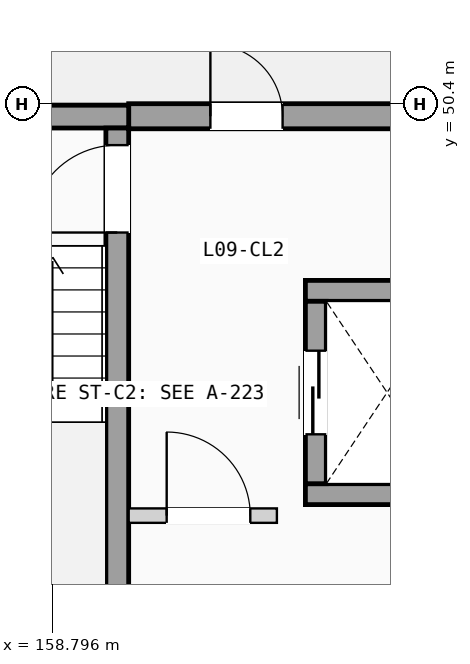
"""IFC4 building model, lengths in metres.
Left out: names, types, materials, properties, quantities, classifications, styles, units other than length and angle.
Written with IfcOpenShell. Run it as: python <this file> out.ifc"""

import sys

from ifc_helpers import new_model, si_unit, direction, frame, frame_2d, origin, place, context, subcontext, project, spatial, rectangle, extrude, element, fill, save


model = new_model("IFC4")
c1 = context("Model", 3, precision=1e-05, world=origin(), true_north=direction((0.0, 1.0)))
c2 = subcontext(c1, "Body", "Model", "MODEL_VIEW")
j1 = project(units=[si_unit("LENGTHUNIT", "METRE"), si_unit("PLANEANGLEUNIT", "RADIAN")], contexts=[c1])
p1 = place(None, origin())
s1 = spatial("IfcSite", under=j1, at=p1, CompositionType="ELEMENT")
p2 = place(p1, origin())
s2 = spatial("IfcBuilding", under=s1, at=p2, CompositionType="ELEMENT")
p3 = place(p2, frame((0.0, 0.0, 30.975)))
s3 = spatial("IfcBuildingStorey", under=s2, at=p3, CompositionType="ELEMENT", Elevation=30.975)
p4 = place(p3, frame((159.8, 50.235, 0.0), z_axis=(0.0, 0.0, 1.0), x_axis=(1.0, 0.0, 0.0)))
e1 = element("IfcWall", 1, at=p4, inside=s3, PredefinedType="SOLIDWALL", context=c2, shape_type="SweptSolid", body=[
    extrude(rectangle(XDim=4.15, YDim=0.33, at=frame_2d((2.075, 0.0))), origin(), (0.0, 0.0, 1.0), 2.9),
])
p5 = place(p4, frame((1.075, 0.0, 0.0)))
e2 = element("IfcOpeningElement", 2, at=p5, cuts=e1, PredefinedType="OPENING", context=c2, shape_type="SweptSolid", body=[
    extrude(rectangle(XDim=0.95, YDim=2.15, at=frame_2d((0.475, 1.075))), frame((0.0, 0.175, 0.0), z_axis=(0.0, -1.0, 0.0), x_axis=(1.0, 0.0, 0.0)), (0.0, 0.0, 1.0), 0.35),
])
p6 = place(p3, frame((156.2, 50.23, 0.0), z_axis=(0.0, 0.0, 1.0), x_axis=(1.0, 0.0, 0.0)))
e3 = element("IfcWall", 3, at=p6, inside=s3, PredefinedType="SHEAR", context=c2, shape_type="SweptSolid", body=[
    extrude(rectangle(XDim=3.6, YDim=0.3, at=frame_2d((1.8, 0.0))), origin(), (0.0, 0.0, 1.0), 2.9),
])
p7 = place(p3, frame((159.65, 43.08, 0.0), z_axis=(0.0, 0.0, 1.0), x_axis=(0.0, 1.0, 0.0)))
e4 = element("IfcWall", 4, at=p7, inside=s3, PredefinedType="SHEAR", context=c2, shape_type="SweptSolid", body=[
    extrude(rectangle(XDim=7.0, YDim=0.3, at=frame_2d((3.5, 0.0))), origin(), (0.0, 0.0, 1.0), 2.9),
])
p8 = place(p7, frame((5.625, 0.0, 0.0)))
e5 = element("IfcOpeningElement", 5, at=p8, cuts=e4, PredefinedType="OPENING", context=c2, shape_type="SweptSolid", body=[
    extrude(rectangle(XDim=1.15, YDim=2.12, at=frame_2d((0.575, 1.06))), frame((0.0, 0.16, 0.0), z_axis=(0.0, -1.0, 0.0), x_axis=(1.0, 0.0, 0.0)), (0.0, 0.0, 1.0), 0.32),
])
for number, where, z_axis, x_axis in (
    (6, (162.125, 45.262, 0.0), (0.0, 0.0, 1.0), (1.0, 0.0, 0.0)),
    (7, (162.125, 47.938, 0.0), (0.0, 0.0, 1.0), (1.0, 0.0, 0.0)),
):
    element("IfcWall", number, at=place(p3, frame(where, z_axis=z_axis, x_axis=x_axis)), inside=s3, PredefinedType="SHEAR", context=c2, shape_type="SweptSolid", body=[
        extrude(rectangle(XDim=2.15, YDim=0.275, at=frame_2d((1.075, 0.0))), origin(), (0.0, 0.0, 1.0), 2.9),
    ])
p9 = place(p3, frame((162.262, 45.4, 0.0), z_axis=(0.0, 0.0, 1.0), x_axis=(0.0, 1.0, 0.0)))
e8 = element("IfcWall", 8, at=p9, inside=s3, PredefinedType="SHEAR", context=c2, shape_type="SweptSolid", body=[
    extrude(rectangle(XDim=2.4, YDim=0.275, at=frame_2d((1.2, 0.0))), origin(), (0.0, 0.0, 1.0), 2.9),
])
p10 = place(p9, frame((0.65, 0.0, 0.0)))
e9 = element("IfcOpeningElement", 9, at=p10, cuts=e8, PredefinedType="OPENING", context=c2, shape_type="SweptSolid", body=[
    extrude(rectangle(XDim=1.1, YDim=2.15, at=frame_2d((0.55, 1.075))), frame((0.0, 0.147, 0.0), z_axis=(0.0, -1.0, 0.0), x_axis=(1.0, 0.0, 0.0)), (0.0, 0.0, 1.0), 0.295),
])
p11 = place(p3, frame((159.8, 44.98, 0.0), z_axis=(0.0, 0.0, 1.0), x_axis=(1.0, 0.0, 0.0)))
e10 = element("IfcWall", 10, at=p11, inside=s3, PredefinedType="PARTITIONING", context=c2, shape_type="SweptSolid", body=[
    extrude(rectangle(XDim=1.95, YDim=0.19, at=frame_2d((0.975, 0.0))), origin(), (0.0, 0.0, 1.0), 2.87),
])
p12 = place(p11, frame((0.5, 0.0, 0.0)))
e11 = element("IfcOpeningElement", 11, at=p12, cuts=e10, PredefinedType="OPENING", context=c2, shape_type="SweptSolid", body=[
    extrude(rectangle(XDim=1.1, YDim=2.12, at=frame_2d((0.55, 1.06))), frame((0.0, 0.105, 0.0), z_axis=(0.0, -1.0, 0.0), x_axis=(1.0, 0.0, 0.0)), (0.0, 0.0, 1.0), 0.21),
])
p13 = place(p5, origin())
e12 = element("IfcDoor", 12, at=p13, inside=s3, OperationType="SINGLE_SWING_LEFT", PredefinedType="DOOR", context=c2, shape_type="SweptSolid", body=[
    extrude(rectangle(XDim=0.95, YDim=2.15, at=frame_2d((0.475, 1.075))), frame((0.0, 0.025, 0.0), z_axis=(0.0, -1.0, 0.0), x_axis=(1.0, 0.0, 0.0)), (0.0, 0.0, 1.0), 0.05),
])
fill(e2, e12)
p14 = place(p8, origin())
e13 = element("IfcDoor", 13, at=p14, inside=s3, OperationType="SINGLE_SWING_LEFT", PredefinedType="DOOR", context=c2, shape_type="SweptSolid", body=[
    extrude(rectangle(XDim=1.15, YDim=2.12, at=frame_2d((0.575, 1.06))), frame((0.0, 0.025, 0.0), z_axis=(0.0, -1.0, 0.0), x_axis=(1.0, 0.0, 0.0)), (0.0, 0.0, 1.0), 0.05),
])
fill(e5, e13)
p15 = place(p10, origin())
e14 = element("IfcDoor", 14, at=p15, inside=s3, OperationType="SLIDING_TO_LEFT", PredefinedType="DOOR", context=c2, shape_type="SweptSolid", body=[
    extrude(rectangle(XDim=1.1, YDim=2.15, at=frame_2d((0.55, 1.075))), frame((0.0, 0.025, 0.0), z_axis=(0.0, -1.0, 0.0), x_axis=(1.0, 0.0, 0.0)), (0.0, 0.0, 1.0), 0.05),
])
fill(e9, e14)
p16 = place(p12, origin())
e15 = element("IfcDoor", 15, at=p16, inside=s3, OperationType="SINGLE_SWING_LEFT", PredefinedType="DOOR", context=c2, shape_type="SweptSolid", body=[
    extrude(rectangle(XDim=1.1, YDim=2.12, at=frame_2d((0.55, 1.06))), frame((0.0, 0.025, 0.0), z_axis=(0.0, -1.0, 0.0), x_axis=(1.0, 0.0, 0.0)), (0.0, 0.0, 1.0), 0.05),
])
fill(e11, e15)
save(model, sys.argv[1])
